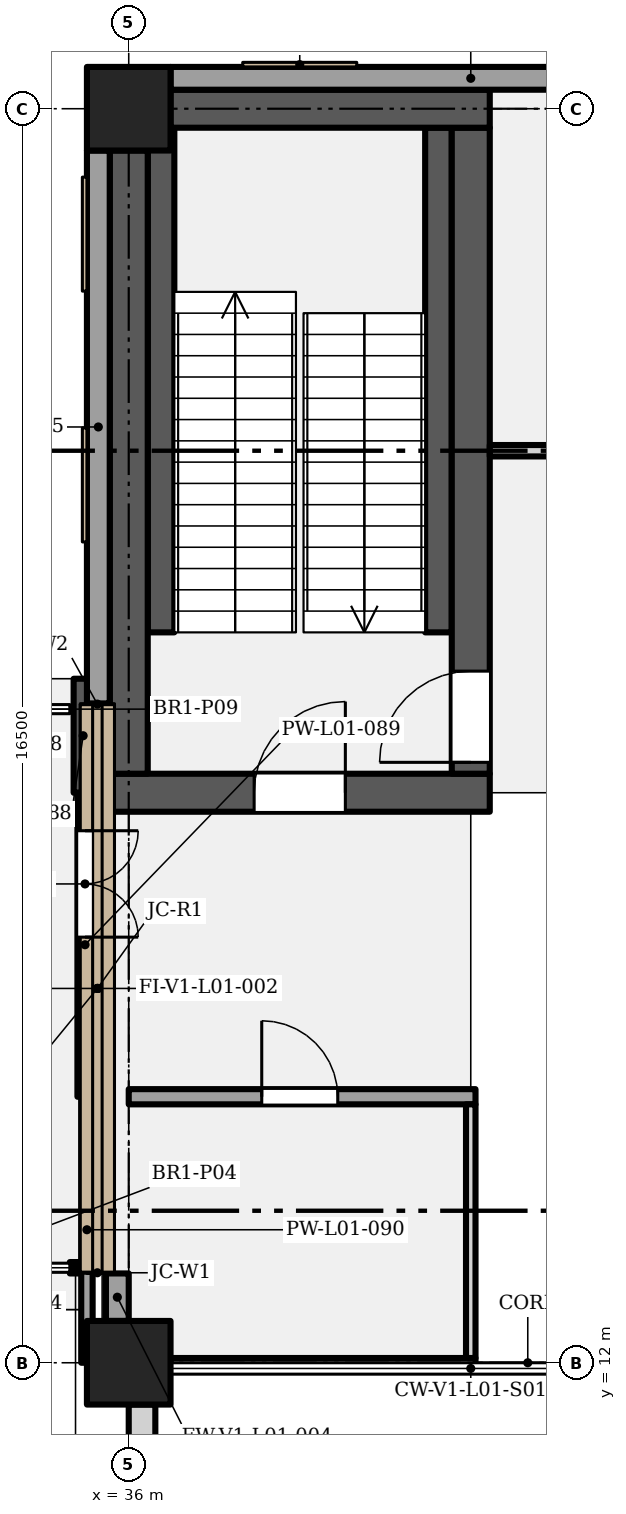
"""IFC4 building model, lengths in metres.
Left out: names, types, materials, properties, quantities, classifications, styles, units other than length and angle.
Written with IfcOpenShell. Run it as: python <this file> out.ifc"""

import sys

from ifc_helpers import new_model, si_unit, direction, frame, frame_2d, origin, origin_2d, place, context, subcontext, project, spatial, rectangle, extrude, element, fill, save


model = new_model("IFC4")
c1 = context("Model", 3, precision=1e-05, world=origin(), true_north=direction((0.0, 1.0)))
c2 = subcontext(c1, "Body", "Model", "MODEL_VIEW")
j1 = project(units=[si_unit("LENGTHUNIT", "METRE"), si_unit("PLANEANGLEUNIT", "RADIAN")], contexts=[c1])
p1 = place(None, origin())
s1 = spatial("IfcSite", under=j1, at=p1, CompositionType="ELEMENT")
p2 = place(p1, origin())
s2 = spatial("IfcBuilding", under=s1, at=p2, CompositionType="ELEMENT")
p3 = place(p2, frame((0.0, 0.0, 6.6)))
s3 = spatial("IfcBuildingStorey", under=s2, at=p3, CompositionType="ELEMENT", Elevation=6.6)
for number, where, z_axis, x_axis in (
    (1, (36.0, 12.0, 0.0), (0.0, 0.0, 1.0), (1.0, 0.0, 0.0)),
    (2, (36.0, 28.5, 0.0), (0.0, 0.0, 1.0), (1.0, 0.0, 0.0)),
):
    element("IfcColumn", number, at=place(p3, frame(where, z_axis=z_axis, x_axis=x_axis)), inside=s3, PredefinedType="COLUMN", context=c2, shape_type="SweptSolid", body=[
        extrude(rectangle(XDim=1.1, YDim=1.1, at=origin_2d()), origin(), (0.0, 0.0, 1.0), 5.4),
    ])
p4 = place(p3, frame((35.75, 19.5, 0.0), z_axis=(0.0, 0.0, 1.0), x_axis=(1.0, 0.0, 0.0)))
e3 = element("IfcWall", 3, at=p4, inside=s3, PredefinedType="SHEAR", context=c2, shape_type="SweptSolid", body=[
    extrude(rectangle(XDim=5.0, YDim=0.5, at=frame_2d((2.5, 0.0))), origin(), (0.0, 0.0, 1.0), 5.1),
])
p5 = place(p4, frame((1.9, 0.0, 0.0)))
e4 = element("IfcOpeningElement", 4, at=p5, cuts=e3, PredefinedType="OPENING", context=c2, shape_type="SweptSolid", body=[
    extrude(rectangle(XDim=1.2, YDim=2.1, at=frame_2d((0.6, 1.05))), frame((0.0, 0.26, 0.0), z_axis=(0.0, -1.0, 0.0), x_axis=(1.0, 0.0, 0.0)), (0.0, 0.0, 1.0), 0.52),
])
p6 = place(p3, frame((36.0, 19.75, 0.0), z_axis=(0.0, 0.0, 1.0), x_axis=(0.0, 1.0, 0.0)))
e5 = element("IfcWall", 5, at=p6, inside=s3, PredefinedType="SHEAR", context=c2, shape_type="SweptSolid", body=[
    extrude(rectangle(XDim=8.2, YDim=0.5, at=frame_2d((4.1, 0.0))), origin(), (0.0, 0.0, 1.0), 5.1),
])
p7 = place(p3, frame((40.5, 19.75, 0.0), z_axis=(0.0, 0.0, 1.0), x_axis=(0.0, 1.0, 0.0)))
e6 = element("IfcWall", 6, at=p7, inside=s3, PredefinedType="SHEAR", context=c2, shape_type="SweptSolid", body=[
    extrude(rectangle(XDim=8.5, YDim=0.5, at=frame_2d((4.25, 0.0))), origin(), (0.0, 0.0, 1.0), 5.1),
])
p8 = place(p7, frame((0.15, 0.0, 0.0)))
e7 = element("IfcOpeningElement", 7, at=p8, cuts=e6, PredefinedType="OPENING", context=c2, shape_type="SweptSolid", body=[
    extrude(rectangle(XDim=1.2, YDim=2.1, at=frame_2d((0.6, 1.05))), frame((0.0, 0.26, 0.0), z_axis=(0.0, -1.0, 0.0), x_axis=(1.0, 0.0, 0.0)), (0.0, 0.0, 1.0), 0.52),
])
p9 = place(p3, frame((36.55, 28.5, 0.0), z_axis=(0.0, 0.0, 1.0), x_axis=(1.0, 0.0, 0.0)))
e8 = element("IfcWall", 8, at=p9, inside=s3, PredefinedType="SHEAR", context=c2, shape_type="SweptSolid", body=[
    extrude(rectangle(XDim=4.2, YDim=0.5, at=frame_2d((2.1, 0.0))), origin(), (0.0, 0.0, 1.0), 5.1),
])
p10 = place(p3, frame((36.55, 28.9, 0.0), z_axis=(0.0, 0.0, 1.0), x_axis=(1.0, 0.0, 0.0)))
e9 = element("IfcWall", 9, at=p10, inside=s3, PredefinedType="SOLIDWALL", context=c2, shape_type="SweptSolid", body=[
    extrude(rectangle(XDim=7.9, YDim=0.3, at=frame_2d((3.95, 0.0))), origin(), (0.0, 0.0, 1.0), 5.1),
])
p11 = place(p10, frame((6.425, 0.0, 1.05)))
e10 = element("IfcOpeningElement", 10, at=p11, cuts=e9, PredefinedType="OPENING", context=c2, shape_type="SweptSolid", body=[
    extrude(rectangle(XDim=1.05, YDim=2.4, at=frame_2d((0.525, 1.2))), frame((0.0, 0.16, 0.0), z_axis=(0.0, -1.0, 0.0), x_axis=(1.0, 0.0, 0.0)), (0.0, 0.0, 1.0), 0.32),
])
p12 = place(p3, frame((35.85, 12.55, 0.0), z_axis=(0.0, 0.0, 1.0), x_axis=(0.0, 1.0, 0.0)))
e11 = element("IfcWall", 11, at=p12, inside=s3, PredefinedType="SOLIDWALL", context=c2, shape_type="SweptSolid", body=[
    extrude(rectangle(XDim=0.625, YDim=0.3, at=frame_2d((0.312, 0.0))), origin(), (0.0, 0.0, 1.0), 5.1),
])
p13 = place(p3, frame((35.6, 20.675, 0.0), z_axis=(0.0, 0.0, 1.0), x_axis=(0.0, 1.0, 0.0)))
e12 = element("IfcWall", 12, at=p13, inside=s3, PredefinedType="SOLIDWALL", context=c2, shape_type="SweptSolid", body=[
    extrude(rectangle(XDim=7.275, YDim=0.3, at=frame_2d((3.637, 0.0))), origin(), (0.0, 0.0, 1.0), 5.1),
])
p14 = place(p3, frame((36.175, 0.7, 0.0), z_axis=(0.0, 0.0, 1.0), x_axis=(0.0, 1.0, 0.0)))
e13 = element("IfcWall", 13, at=p14, inside=s3, PredefinedType="SOLIDWALL", context=c2, shape_type="SweptSolid", body=[
    extrude(rectangle(XDim=10.75, YDim=0.35, at=frame_2d((5.375, 0.0))), origin(), (0.0, 0.0, 1.0), 5.4),
])
p15 = place(p3, frame((36.55, 12.0, 0.0), z_axis=(0.0, 0.0, 1.0), x_axis=(1.0, 0.0, 0.0)))
e14 = element("IfcWall", 14, at=p15, inside=s3, PredefinedType="PARTITIONING", context=c2, shape_type="SweptSolid", body=[
    extrude(rectangle(XDim=4.012, YDim=0.125, at=frame_2d((2.006, 0.0))), origin(), (0.0, 0.0, 1.0), 4.3),
])
p16 = place(p3, frame((36.0, 15.5, 0.0), z_axis=(0.0, 0.0, 1.0), x_axis=(1.0, 0.0, 0.0)))
e15 = element("IfcWall", 15, at=p16, inside=s3, PredefinedType="PARTITIONING", context=c2, shape_type="SweptSolid", body=[
    extrude(rectangle(XDim=4.562, YDim=0.2, at=frame_2d((2.281, 0.0))), origin(), (0.0, 0.0, 1.0), 5.1),
])
p17 = place(p16, frame((1.75, 0.0, 0.0)))
e16 = element("IfcOpeningElement", 16, at=p17, cuts=e15, PredefinedType="OPENING", context=c2, shape_type="SweptSolid", body=[
    extrude(rectangle(XDim=1.0, YDim=2.4, at=frame_2d((0.5, 1.2))), frame((0.0, 0.11, 0.0), z_axis=(0.0, -1.0, 0.0), x_axis=(1.0, 0.0, 0.0)), (0.0, 0.0, 1.0), 0.22),
])
p18 = place(p3, frame((40.75, 24.0, 0.0), z_axis=(0.0, 0.0, 1.0), x_axis=(1.0, 0.0, 0.0)))
e17 = element("IfcWall", 17, at=p18, inside=s3, PredefinedType="PARTITIONING", context=c2, shape_type="SweptSolid", body=[
    extrude(rectangle(XDim=4.25, YDim=0.15, at=frame_2d((2.125, 0.0))), origin(), (0.0, 0.0, 1.0), 5.1),
])
p19 = place(p18, frame((2.5, 0.0, 0.0), z_axis=(0.0, 0.0, 1.0), x_axis=(-1.0, 0.0, 0.0)))
e18 = element("IfcOpeningElement", 18, at=p19, cuts=e17, PredefinedType="OPENING", context=c2, shape_type="SweptSolid", body=[
    extrude(rectangle(XDim=1.0, YDim=2.4, at=frame_2d((0.5, 1.2))), frame((0.0, 0.085, 0.0), z_axis=(0.0, -1.0, 0.0), x_axis=(1.0, 0.0, 0.0)), (0.0, 0.0, 1.0), 0.17),
])
p20 = place(p3, frame((35.4, 19.5, 0.0), z_axis=(0.0, 0.0, 1.0), x_axis=(0.0, 1.0, 0.0)))
e19 = element("IfcWall", 19, at=p20, inside=s3, PredefinedType="SHEAR", context=c2, shape_type="SweptSolid", body=[
    extrude(rectangle(XDim=1.5, YDim=0.25, at=frame_2d((0.75, 0.0))), origin(), (0.0, 0.0, 1.0), 3.3),
])
p21 = place(p3, frame((35.425, 15.5, 0.0), z_axis=(0.0, 0.0, 1.0), x_axis=(0.0, 1.0, 0.0)))
e20 = element("IfcWall", 20, at=p21, inside=s3, PredefinedType="PARTITIONING", context=c2, shape_type="SweptSolid", body=[
    extrude(rectangle(XDim=4.0, YDim=0.2, at=frame_2d((2.0, 0.0))), origin(), (0.0, 0.0, 1.0), 3.3),
])
p22 = place(p21, frame((3.5, 0.0, 0.0), z_axis=(0.0, 0.0, 1.0), x_axis=(-1.0, 0.0, 0.0)))
e21 = element("IfcOpeningElement", 21, at=p22, cuts=e20, PredefinedType="OPENING", context=c2, shape_type="SweptSolid", body=[
    extrude(rectangle(XDim=1.4, YDim=2.4, at=frame_2d((0.7, 1.2))), frame((0.0, 0.11, 0.0), z_axis=(0.0, -1.0, 0.0), x_axis=(1.0, 0.0, 0.0)), (0.0, 0.0, 1.0), 0.22),
])
p23 = place(p3, frame((35.45, 12.0, 0.0), z_axis=(0.0, 0.0, 1.0), x_axis=(0.0, 1.0, 0.0)))
e22 = element("IfcWall", 22, at=p23, inside=s3, PredefinedType="PARTITIONING", context=c2, shape_type="SweptSolid", body=[
    extrude(rectangle(XDim=3.5, YDim=0.15, at=frame_2d((1.75, 0.0))), origin(), (0.0, 0.0, 1.0), 3.3),
])
p24 = place(p3, frame((40.5, 12.062, 0.0), z_axis=(0.0, 0.0, 1.0), x_axis=(0.0, 1.0, 0.0)))
e23 = element("IfcWall", 23, at=p24, inside=s3, PredefinedType="PARTITIONING", context=c2, shape_type="SweptSolid", body=[
    extrude(rectangle(XDim=3.337, YDim=0.125, at=frame_2d((1.669, 0.0))), origin(), (0.0, 0.0, 1.0), 4.0),
])
p25 = place(p3, frame((36.425, 21.61, 0.0), z_axis=(0.0, 0.0, 1.0), x_axis=(0.0, 1.0, 0.0)))
e24 = element("IfcWall", 24, at=p25, inside=s3, PredefinedType="SHEAR", context=c2, shape_type="SweptSolid", body=[
    extrude(rectangle(XDim=6.64, YDim=0.35, at=frame_2d((3.32, 0.0))), origin(), (0.0, 0.0, 1.0), 5.1),
])
p26 = place(p3, frame((40.075, 21.61, 0.0), z_axis=(0.0, 0.0, 1.0), x_axis=(0.0, 1.0, 0.0)))
e25 = element("IfcWall", 25, at=p26, inside=s3, PredefinedType="SHEAR", context=c2, shape_type="SweptSolid", body=[
    extrude(rectangle(XDim=6.64, YDim=0.35, at=frame_2d((3.32, 0.0))), origin(), (0.0, 0.0, 1.0), 2.587),
])
p27 = place(p3, frame((35.225, 13.25, 0.0), z_axis=(0.0, 0.0, 1.0), x_axis=(1.0, 0.0, 0.0)))
e26 = element("IfcWall", 26, at=p27, inside=s3, PredefinedType="SOLIDWALL", context=c2, shape_type="SweptSolid", body=[
    extrude(rectangle(XDim=0.15, YDim=0.15, at=frame_2d((0.075, 0.0))), origin(), (0.0, 0.0, 1.0), 3.3),
])
p28 = place(p22, origin())
e27 = element("IfcDoor", 27, at=p28, inside=s3, OperationType="DOUBLE_DOOR_SINGLE_SWING", PredefinedType="DOOR", context=c2, shape_type="SweptSolid", body=[
    extrude(rectangle(XDim=1.4, YDim=2.4, at=frame_2d((0.7, 1.2))), frame((0.0, 0.025, 0.0), z_axis=(0.0, -1.0, 0.0), x_axis=(1.0, 0.0, 0.0)), (0.0, 0.0, 1.0), 0.05),
])
fill(e21, e27)
p29 = place(p5, origin())
e28 = element("IfcDoor", 28, at=p29, inside=s3, OperationType="SINGLE_SWING_RIGHT", PredefinedType="DOOR", context=c2, shape_type="SweptSolid", body=[
    extrude(rectangle(XDim=1.2, YDim=2.1, at=frame_2d((0.6, 1.05))), frame((0.0, 0.025, 0.0), z_axis=(0.0, -1.0, 0.0), x_axis=(1.0, 0.0, 0.0)), (0.0, 0.0, 1.0), 0.05),
])
fill(e4, e28)
p30 = place(p17, origin())
e29 = element("IfcDoor", 29, at=p30, inside=s3, OperationType="SINGLE_SWING_LEFT", PredefinedType="DOOR", context=c2, shape_type="SweptSolid", body=[
    extrude(rectangle(XDim=1.0, YDim=2.4, at=frame_2d((0.5, 1.2))), frame((0.0, 0.025, 0.0), z_axis=(0.0, -1.0, 0.0), x_axis=(1.0, 0.0, 0.0)), (0.0, 0.0, 1.0), 0.05),
])
fill(e16, e29)
p31 = place(p8, origin())
e30 = element("IfcDoor", 30, at=p31, inside=s3, OperationType="SINGLE_SWING_LEFT", PredefinedType="DOOR", context=c2, shape_type="SweptSolid", body=[
    extrude(rectangle(XDim=1.2, YDim=2.1, at=frame_2d((0.6, 1.05))), frame((0.0, 0.025, 0.0), z_axis=(0.0, -1.0, 0.0), x_axis=(1.0, 0.0, 0.0)), (0.0, 0.0, 1.0), 0.05),
])
fill(e7, e30)
save(model, sys.argv[1])
